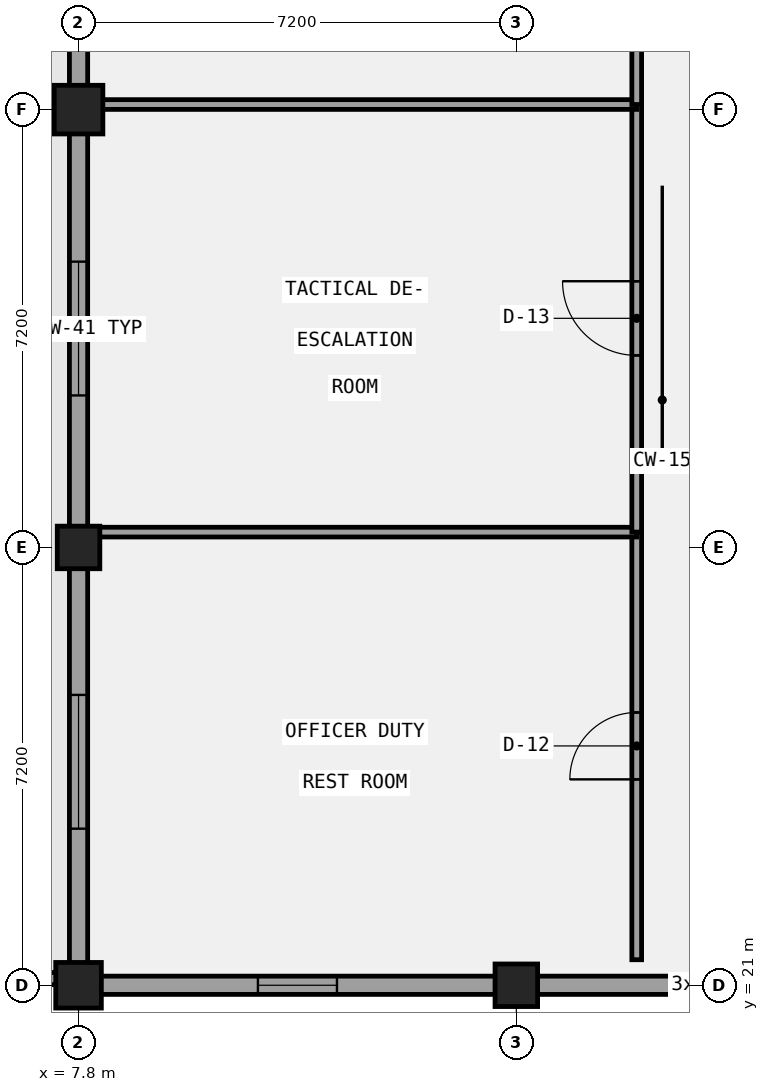
"""IFC4 building model, lengths in metres.
Left out: names, types, materials, properties, quantities, classifications, styles, units other than length and angle.
Written with IfcOpenShell. Run it as: python <this file> out.ifc"""

import sys

from ifc_helpers import new_model, si_unit, direction, frame, frame_2d, origin, origin_2d, place, context, subcontext, project, spatial, rectangle, extrude, element, fill, save


model = new_model("IFC4")
c1 = context("Model", 3, precision=1e-05, world=origin(), true_north=direction((0.0, 1.0)))
c2 = subcontext(c1, "Body", "Model", "MODEL_VIEW")
j1 = project(units=[si_unit("LENGTHUNIT", "METRE"), si_unit("PLANEANGLEUNIT", "RADIAN")], contexts=[c1])
p1 = place(None, origin())
s1 = spatial("IfcSite", under=j1, at=p1, CompositionType="ELEMENT")
p2 = place(p1, origin())
s2 = spatial("IfcBuilding", under=s1, at=p2, CompositionType="ELEMENT")
p3 = place(p2, frame((0.0, 0.0, 5.4)))
s3 = spatial("IfcBuildingStorey", under=s2, at=p3, CompositionType="ELEMENT", Elevation=5.4)
p4 = place(p3, frame((7.8, 21.0, 0.0), z_axis=(0.0, 0.0, 1.0), x_axis=(1.0, 0.0, 0.0)))
e1 = element("IfcColumn", 1, at=p4, inside=s3, PredefinedType="COLUMN", context=c2, shape_type="SweptSolid", body=[
    extrude(rectangle(XDim=0.75, YDim=0.75, at=origin_2d()), origin(), (0.0, 0.0, 1.0), 4.2),
])
p5 = place(p3, frame((7.8, 28.2, 0.0), z_axis=(0.0, 0.0, 1.0), x_axis=(1.0, 0.0, 0.0)))
e2 = element("IfcColumn", 2, at=p5, inside=s3, PredefinedType="COLUMN", context=c2, shape_type="SweptSolid", body=[
    extrude(rectangle(XDim=0.7, YDim=0.7, at=origin_2d()), origin(), (0.0, 0.0, 1.0), 4.2),
])
p6 = place(p3, frame((7.8, 35.4, 0.0), z_axis=(0.0, 0.0, 1.0), x_axis=(1.0, 0.0, 0.0)))
e3 = element("IfcColumn", 3, at=p6, inside=s3, PredefinedType="COLUMN", context=c2, shape_type="SweptSolid", body=[
    extrude(rectangle(XDim=0.8, YDim=0.8, at=origin_2d()), origin(), (0.0, 0.0, 1.0), 4.2),
])
p7 = place(p3, frame((15.0, 21.0, 0.0), z_axis=(0.0, 0.0, 1.0), x_axis=(1.0, 0.0, 0.0)))
e4 = element("IfcColumn", 4, at=p7, inside=s3, PredefinedType="COLUMN", context=c2, shape_type="SweptSolid", body=[
    extrude(rectangle(XDim=0.7, YDim=0.7, at=origin_2d()), origin(), (0.0, 0.0, 1.0), 4.2),
])
p8 = place(p3, frame((7.8, 56.85, 0.0), z_axis=(0.0, 0.0, 1.0), x_axis=(0.0, -1.0, 0.0)))
e5 = element("IfcWall", 5, at=p8, inside=s3, PredefinedType="SOLIDWALL", context=c2, shape_type="SweptSolid", body=[
    extrude(rectangle(XDim=35.7, YDim=0.3, at=frame_2d((17.85, 0.0))), origin(), (0.0, 0.0, 1.0), 3.12),
])
p9 = place(p8, frame((31.075, 0.0, 1.0)))
e6 = element("IfcOpeningElement", 6, at=p9, cuts=e5, PredefinedType="OPENING", context=c2, shape_type="SweptSolid", body=[
    extrude(rectangle(XDim=2.2, YDim=1.4, at=frame_2d((1.1, 0.7))), frame((0.0, 0.16, 0.0), z_axis=(0.0, -1.0, 0.0), x_axis=(1.0, 0.0, 0.0)), (0.0, 0.0, 1.0), 0.32),
])
p10 = place(p8, frame((23.95, 0.0, 1.0)))
e7 = element("IfcOpeningElement", 7, at=p10, cuts=e5, PredefinedType="OPENING", context=c2, shape_type="SweptSolid", body=[
    extrude(rectangle(XDim=2.2, YDim=1.4, at=frame_2d((1.1, 0.7))), frame((0.0, 0.16, 0.0), z_axis=(0.0, -1.0, 0.0), x_axis=(1.0, 0.0, 0.0)), (0.0, 0.0, 1.0), 0.32),
])
p11 = place(p8, frame((16.75, 0.0, 1.0)))
e8 = element("IfcOpeningElement", 8, at=p11, cuts=e5, PredefinedType="OPENING", context=c2, shape_type="SweptSolid", body=[
    extrude(rectangle(XDim=2.2, YDim=1.4, at=frame_2d((1.1, 0.7))), frame((0.0, 0.16, 0.0), z_axis=(0.0, -1.0, 0.0), x_axis=(1.0, 0.0, 0.0)), (0.0, 0.0, 1.0), 0.32),
])
p12 = place(p8, frame((9.55, 0.0, 1.0)))
e9 = element("IfcOpeningElement", 9, at=p12, cuts=e5, PredefinedType="OPENING", context=c2, shape_type="SweptSolid", body=[
    extrude(rectangle(XDim=2.2, YDim=1.4, at=frame_2d((1.1, 0.7))), frame((0.0, 0.16, 0.0), z_axis=(0.0, -1.0, 0.0), x_axis=(1.0, 0.0, 0.0)), (0.0, 0.0, 1.0), 0.32),
])
p13 = place(p8, frame((2.425, 0.0, 1.0)))
e10 = element("IfcOpeningElement", 10, at=p13, cuts=e5, PredefinedType="OPENING", context=c2, shape_type="SweptSolid", body=[
    extrude(rectangle(XDim=2.2, YDim=1.4, at=frame_2d((1.1, 0.7))), frame((0.0, 0.16, 0.0), z_axis=(0.0, -1.0, 0.0), x_axis=(1.0, 0.0, 0.0)), (0.0, 0.0, 1.0), 0.32),
])
p14 = place(p3, frame((7.65, 21.0, 0.0), z_axis=(0.0, 0.0, 1.0), x_axis=(1.0, 0.0, 0.0)))
e11 = element("IfcWall", 11, at=p14, inside=s3, PredefinedType="SOLIDWALL", context=c2, shape_type="SweptSolid", body=[
    extrude(rectangle(XDim=21.9, YDim=0.3, at=frame_2d((10.95, 0.0))), origin(), (0.0, 0.0, 1.0), 2.92),
])
p15 = place(p14, frame((3.1, 0.0, 1.0)))
e12 = element("IfcOpeningElement", 12, at=p15, cuts=e11, PredefinedType="OPENING", context=c2, shape_type="SweptSolid", body=[
    extrude(rectangle(XDim=1.3, YDim=1.65, at=frame_2d((0.65, 0.825))), frame((0.0, 0.16, 0.0), z_axis=(0.0, -1.0, 0.0), x_axis=(1.0, 0.0, 0.0)), (0.0, 0.0, 1.0), 0.32),
])
p16 = place(p14, frame((10.3, 0.0, 1.0)))
e13 = element("IfcOpeningElement", 13, at=p16, cuts=e11, PredefinedType="OPENING", context=c2, shape_type="SweptSolid", body=[
    extrude(rectangle(XDim=1.3, YDim=1.65, at=frame_2d((0.65, 0.825))), frame((0.0, 0.16, 0.0), z_axis=(0.0, -1.0, 0.0), x_axis=(1.0, 0.0, 0.0)), (0.0, 0.0, 1.0), 0.32),
])
p17 = place(p14, frame((17.5, 0.0, 1.0)))
e14 = element("IfcOpeningElement", 14, at=p17, cuts=e11, PredefinedType="OPENING", context=c2, shape_type="SweptSolid", body=[
    extrude(rectangle(XDim=1.3, YDim=1.65, at=frame_2d((0.65, 0.825))), frame((0.0, 0.16, 0.0), z_axis=(0.0, -1.0, 0.0), x_axis=(1.0, 0.0, 0.0)), (0.0, 0.0, 1.0), 0.32),
])
p18 = place(p3, frame((7.58, 21.11, 0.0), z_axis=(0.0, 0.0, 1.0), x_axis=(-1.0, 0.0, 0.0)))
e15 = element("IfcWall", 15, at=p18, inside=s3, PredefinedType="PARAPET", context=c2, shape_type="SweptSolid", body=[
    extrude(rectangle(XDim=7.47, YDim=0.2, at=frame_2d((3.735, 0.0))), origin(), (0.0, 0.0, 1.0), 1.12),
])
p19 = place(p3, frame((16.98, 21.42, 0.0), z_axis=(0.0, 0.0, 1.0), x_axis=(0.0, 1.0, 0.0)))
e16 = element("IfcWall", 16, at=p19, inside=s3, PredefinedType="PARTITIONING", context=c2, shape_type="SweptSolid", body=[
    extrude(rectangle(XDim=7.032, YDim=0.16, at=frame_2d((3.516, 0.0))), origin(), (0.0, 0.0, 1.0), 3.92),
])
p20 = place(p19, frame((2.966, 0.0, 0.0)))
e17 = element("IfcOpeningElement", 17, at=p20, cuts=e16, PredefinedType="OPENING", context=c2, shape_type="SweptSolid", body=[
    extrude(rectangle(XDim=1.1, YDim=2.35, at=frame_2d((0.55, 1.175))), frame((0.0, 0.09, 0.0), z_axis=(0.0, -1.0, 0.0), x_axis=(1.0, 0.0, 0.0)), (0.0, 0.0, 1.0), 0.18),
])
p21 = place(p3, frame((7.98, 28.452, 0.0), z_axis=(0.0, 0.0, 1.0), x_axis=(1.0, 0.0, 0.0)))
e18 = element("IfcWall", 18, at=p21, inside=s3, PredefinedType="PARTITIONING", context=c2, shape_type="SweptSolid", body=[
    extrude(rectangle(XDim=9.0, YDim=0.16, at=frame_2d((4.5, 0.0))), origin(), (0.0, 0.0, 1.0), 2.72),
])
p22 = place(p3, frame((16.98, 28.452, 0.0), z_axis=(0.0, 0.0, 1.0), x_axis=(0.0, 1.0, 0.0)))
e19 = element("IfcWall", 19, at=p22, inside=s3, PredefinedType="PARTITIONING", context=c2, shape_type="SweptSolid", body=[
    extrude(rectangle(XDim=7.032, YDim=0.16, at=frame_2d((3.516, 0.0))), origin(), (0.0, 0.0, 1.0), 3.92),
])
p23 = place(p22, frame((2.906, 0.0, 0.0)))
e20 = element("IfcOpeningElement", 20, at=p23, cuts=e19, PredefinedType="OPENING", context=c2, shape_type="SweptSolid", body=[
    extrude(rectangle(XDim=1.22, YDim=2.1, at=frame_2d((0.61, 1.05))), frame((0.0, 0.09, 0.0), z_axis=(0.0, -1.0, 0.0), x_axis=(1.0, 0.0, 0.0)), (0.0, 0.0, 1.0), 0.18),
])
p24 = place(p3, frame((7.98, 35.484, 0.0), z_axis=(0.0, 0.0, 1.0), x_axis=(1.0, 0.0, 0.0)))
e21 = element("IfcWall", 21, at=p24, inside=s3, PredefinedType="PARTITIONING", context=c2, shape_type="SweptSolid", body=[
    extrude(rectangle(XDim=9.0, YDim=0.16, at=frame_2d((4.5, 0.0))), origin(), (0.0, 0.0, 1.0), 2.72),
])
p25 = place(p3, frame((16.98, 35.484, 0.0), z_axis=(0.0, 0.0, 1.0), x_axis=(0.0, 1.0, 0.0)))
e22 = element("IfcWall", 22, at=p25, inside=s3, PredefinedType="PARTITIONING", context=c2, shape_type="SweptSolid", body=[
    extrude(rectangle(XDim=7.032, YDim=0.16, at=frame_2d((3.516, 0.0))), origin(), (0.0, 0.0, 1.0), 3.92),
])
p26 = place(p25, frame((2.906, 0.0, 0.0)))
e23 = element("IfcOpeningElement", 23, at=p26, cuts=e22, PredefinedType="OPENING", context=c2, shape_type="SweptSolid", body=[
    extrude(rectangle(XDim=1.22, YDim=2.22, at=frame_2d((0.61, 1.11))), frame((0.0, 0.09, 0.0), z_axis=(0.0, -1.0, 0.0), x_axis=(1.0, 0.0, 0.0)), (0.0, 0.0, 1.0), 0.18),
])
p27 = place(p9, origin())
e24 = element("IfcWindow", 24, at=p27, inside=s3, PartitioningType="SINGLE_PANEL", PredefinedType="WINDOW", context=c2, shape_type="SweptSolid", body=[
    extrude(rectangle(XDim=2.2, YDim=1.4, at=frame_2d((1.1, 0.7))), frame((0.0, 0.03, 0.0), z_axis=(0.0, -1.0, 0.0), x_axis=(1.0, 0.0, 0.0)), (0.0, 0.0, 1.0), 0.06),
])
fill(e6, e24)
p28 = place(p10, origin())
e25 = element("IfcWindow", 25, at=p28, inside=s3, PartitioningType="SINGLE_PANEL", PredefinedType="WINDOW", context=c2, shape_type="SweptSolid", body=[
    extrude(rectangle(XDim=2.2, YDim=1.4, at=frame_2d((1.1, 0.7))), frame((0.0, 0.03, 0.0), z_axis=(0.0, -1.0, 0.0), x_axis=(1.0, 0.0, 0.0)), (0.0, 0.0, 1.0), 0.06),
])
fill(e7, e25)
p29 = place(p15, origin())
e26 = element("IfcWindow", 26, at=p29, inside=s3, PartitioningType="SINGLE_PANEL", PredefinedType="WINDOW", context=c2, shape_type="SweptSolid", body=[
    extrude(rectangle(XDim=1.3, YDim=1.65, at=frame_2d((0.65, 0.825))), frame((0.0, 0.03, 0.0), z_axis=(0.0, -1.0, 0.0), x_axis=(1.0, 0.0, 0.0)), (0.0, 0.0, 1.0), 0.06),
])
fill(e12, e26)
p30 = place(p20, frame((1.1, 0.0, 0.0), z_axis=(0.0, 0.0, 1.0), x_axis=(-1.0, 0.0, 0.0)))
e27 = element("IfcDoor", 27, at=p30, inside=s3, OperationType="SINGLE_SWING_LEFT", PredefinedType="DOOR", context=c2, shape_type="SweptSolid", body=[
    extrude(rectangle(XDim=1.1, YDim=2.35, at=frame_2d((0.55, 1.175))), frame((0.0, 0.025, 0.0), z_axis=(0.0, -1.0, 0.0), x_axis=(1.0, 0.0, 0.0)), (0.0, 0.0, 1.0), 0.05),
])
fill(e17, e27)
p31 = place(p23, frame((1.22, 0.0, 0.0), z_axis=(0.0, 0.0, 1.0), x_axis=(-1.0, 0.0, 0.0)))
e28 = element("IfcDoor", 28, at=p31, inside=s3, OperationType="SINGLE_SWING_RIGHT", PredefinedType="DOOR", context=c2, shape_type="SweptSolid", body=[
    extrude(rectangle(XDim=1.22, YDim=2.1, at=frame_2d((0.61, 1.05))), frame((0.0, 0.025, 0.0), z_axis=(0.0, -1.0, 0.0), x_axis=(1.0, 0.0, 0.0)), (0.0, 0.0, 1.0), 0.05),
])
fill(e20, e28)
save(model, sys.argv[1])
